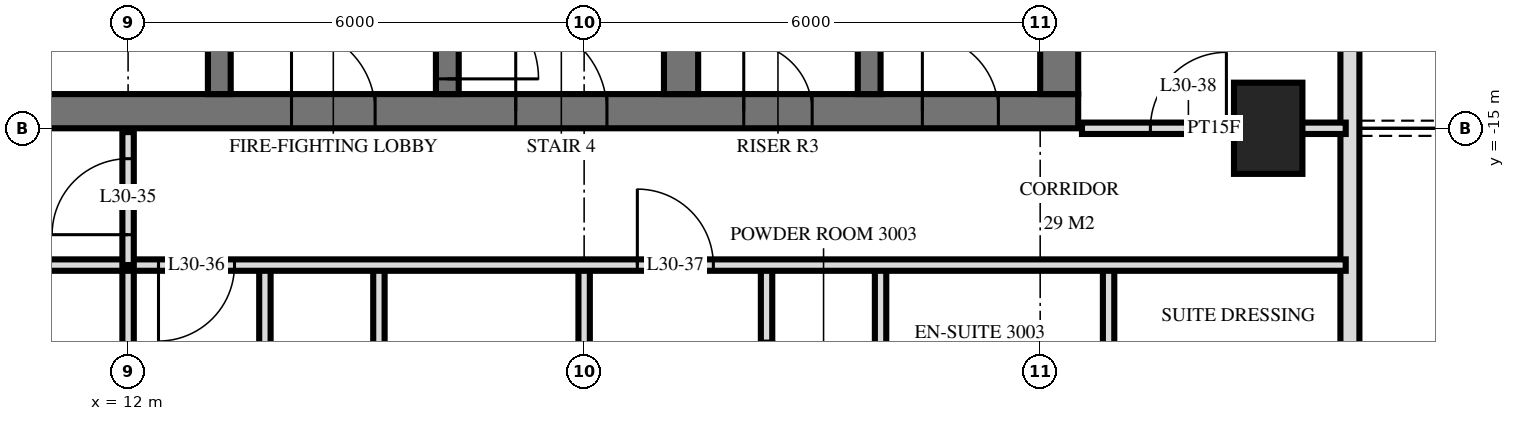
"""IFC4 building model, lengths in metres.
Left out: names, types, materials, properties, quantities, classifications, styles, units other than length and angle.
Written with IfcOpenShell. Run it as: python <this file> out.ifc"""

import sys

from ifc_helpers import new_model, si_unit, direction, frame, frame_2d, origin, origin_2d, place, context, subcontext, project, spatial, rectangle, extrude, element, fill, save


model = new_model("IFC4")
c1 = context("Model", 3, precision=1e-05, world=origin(), true_north=direction((0.0, 1.0)))
c2 = subcontext(c1, "Body", "Model", "MODEL_VIEW")
j1 = project(units=[si_unit("LENGTHUNIT", "METRE"), si_unit("PLANEANGLEUNIT", "RADIAN")], contexts=[c1])
p1 = place(None, origin())
s1 = spatial("IfcSite", under=j1, at=p1, CompositionType="ELEMENT")
p2 = place(p1, origin())
s2 = spatial("IfcBuilding", under=s1, at=p2, CompositionType="ELEMENT")
p3 = place(p2, frame((0.0, 0.0, 120.0)))
s3 = spatial("IfcBuildingStorey", under=s2, at=p3, CompositionType="ELEMENT", Elevation=120.0)
p4 = place(p3, frame((27.0, -15.0, 0.0), z_axis=(0.0, 0.0, 1.0), x_axis=(0.0, 1.0, 0.0)))
e1 = element("IfcColumn", 1, at=p4, inside=s3, PredefinedType="COLUMN", context=c2, shape_type="SweptSolid", body=[
    extrude(rectangle(XDim=1.2, YDim=0.9, at=origin_2d()), origin(), (0.0, 0.0, 1.0), 3.6),
])
p5 = place(p3, frame((10.0, -14.775, 0.0), z_axis=(0.0, 0.0, 1.0), x_axis=(1.0, 0.0, 0.0)))
e2 = element("IfcWall", 2, at=p5, inside=s3, PredefinedType="SHEAR", context=c2, shape_type="SweptSolid", body=[
    extrude(rectangle(XDim=14.5, YDim=0.45, at=frame_2d((7.25, 0.0))), origin(), (0.0, 0.0, 1.0), 3.6),
])
p6 = place(p5, frame((7.1, 0.0, 0.0)))
e3 = element("IfcOpeningElement", 3, at=p6, cuts=e2, PredefinedType="OPENING", context=c2, shape_type="SweptSolid", body=[
    extrude(rectangle(XDim=1.2, YDim=2.1, at=frame_2d((0.6, 1.05))), frame((0.0, 0.235, 0.0), z_axis=(0.0, -1.0, 0.0), x_axis=(1.0, 0.0, 0.0)), (0.0, 0.0, 1.0), 0.47),
])
p7 = place(p5, frame((4.15, 0.0, 0.0)))
e4 = element("IfcOpeningElement", 4, at=p7, cuts=e2, PredefinedType="OPENING", context=c2, shape_type="SweptSolid", body=[
    extrude(rectangle(XDim=1.1, YDim=2.1, at=frame_2d((0.55, 1.05))), frame((0.0, 0.235, 0.0), z_axis=(0.0, -1.0, 0.0), x_axis=(1.0, 0.0, 0.0)), (0.0, 0.0, 1.0), 0.47),
])
p8 = place(p5, frame((10.1, 0.0, 0.0)))
e5 = element("IfcOpeningElement", 5, at=p8, cuts=e2, PredefinedType="OPENING", context=c2, shape_type="SweptSolid", body=[
    extrude(rectangle(XDim=0.9, YDim=2.1, at=frame_2d((0.45, 1.05))), frame((0.0, 0.235, 0.0), z_axis=(0.0, -1.0, 0.0), x_axis=(1.0, 0.0, 0.0)), (0.0, 0.0, 1.0), 0.47),
])
p9 = place(p5, frame((12.45, 0.0, 0.0)))
e6 = element("IfcOpeningElement", 6, at=p9, cuts=e2, PredefinedType="OPENING", context=c2, shape_type="SweptSolid", body=[
    extrude(rectangle(XDim=1.0, YDim=2.1, at=frame_2d((0.5, 1.05))), frame((0.0, 0.235, 0.0), z_axis=(0.0, -1.0, 0.0), x_axis=(1.0, 0.0, 0.0)), (0.0, 0.0, 1.0), 0.47),
])
p10 = place(p3, frame((24.25, -14.55, 0.0), z_axis=(0.0, 0.0, 1.0), x_axis=(0.0, 1.0, 0.0)))
e7 = element("IfcWall", 7, at=p10, inside=s3, PredefinedType="SHEAR", context=c2, shape_type="SweptSolid", body=[
    extrude(rectangle(XDim=14.1, YDim=0.5, at=frame_2d((7.05, 0.0))), origin(), (0.0, 0.0, 1.0), 3.6),
])
p11 = place(p3, frame((13.2, -14.55, 0.0), z_axis=(0.0, 0.0, 1.0), x_axis=(0.0, 1.0, 0.0)))
e8 = element("IfcWall", 8, at=p11, inside=s3, PredefinedType="SHEAR", context=c2, shape_type="SweptSolid", body=[
    extrude(rectangle(XDim=5.4, YDim=0.3, at=frame_2d((2.7, 0.0))), origin(), (0.0, 0.0, 1.0), 3.6),
])
p12 = place(p11, frame((4.0, 0.0, 0.0)))
e9 = element("IfcOpeningElement", 9, at=p12, cuts=e8, PredefinedType="OPENING", context=c2, shape_type="SweptSolid", body=[
    extrude(rectangle(XDim=1.2, YDim=2.1, at=frame_2d((0.6, 1.05))), frame((0.0, 0.16, 0.0), z_axis=(0.0, -1.0, 0.0), x_axis=(1.0, 0.0, 0.0)), (0.0, 0.0, 1.0), 0.32),
])
p13 = place(p3, frame((16.2, -14.55, 0.0), z_axis=(0.0, 0.0, 1.0), x_axis=(0.0, 1.0, 0.0)))
e10 = element("IfcWall", 10, at=p13, inside=s3, PredefinedType="SHEAR", context=c2, shape_type="SweptSolid", body=[
    extrude(rectangle(XDim=5.4, YDim=0.3, at=frame_2d((2.7, 0.0))), origin(), (0.0, 0.0, 1.0), 3.6),
])
p14 = place(p13, frame((0.2, 0.0, 0.0)))
e11 = element("IfcOpeningElement", 11, at=p14, cuts=e10, PredefinedType="OPENING", context=c2, shape_type="SweptSolid", body=[
    extrude(rectangle(XDim=1.2, YDim=2.1, at=frame_2d((0.6, 1.05))), frame((0.0, 0.16, 0.0), z_axis=(0.0, -1.0, 0.0), x_axis=(1.0, 0.0, 0.0)), (0.0, 0.0, 1.0), 0.32),
])
p15 = place(p3, frame((19.275, -14.55, 0.0), z_axis=(0.0, 0.0, 1.0), x_axis=(0.0, 1.0, 0.0)))
e12 = element("IfcWall", 12, at=p15, inside=s3, PredefinedType="SHEAR", context=c2, shape_type="SweptSolid", body=[
    extrude(rectangle(XDim=5.4, YDim=0.45, at=frame_2d((2.7, 0.0))), origin(), (0.0, 0.0, 1.0), 3.6),
])
p16 = place(p3, frame((21.75, -14.55, 0.0), z_axis=(0.0, 0.0, 1.0), x_axis=(0.0, 1.0, 0.0)))
e13 = element("IfcWall", 13, at=p16, inside=s3, PredefinedType="SHEAR", context=c2, shape_type="SweptSolid", body=[
    extrude(rectangle(XDim=5.4, YDim=0.3, at=frame_2d((2.7, 0.0))), origin(), (0.0, 0.0, 1.0), 3.6),
])
p17 = place(p3, frame((28.075, -29.275, 0.0), z_axis=(0.0, 0.0, 1.0), x_axis=(0.0, 1.0, 0.0)))
e14 = element("IfcWall", 14, at=p17, inside=s3, PredefinedType="SOLIDWALL", context=c2, shape_type="SweptSolid", body=[
    extrude(rectangle(XDim=25.951, YDim=0.25, at=frame_2d((12.975, 0.0))), origin(), (0.0, 0.0, 1.0), 3.32),
])
p18 = place(p17, frame((0.575, 0.0, 0.0)))
e15 = element("IfcOpeningElement", 15, at=p18, cuts=e14, PredefinedType="OPENING", context=c2, shape_type="SweptSolid", body=[
    extrude(rectangle(XDim=1.8, YDim=2.4, at=frame_2d((0.9, 1.2))), frame((0.0, 0.135, 0.0), z_axis=(0.0, -1.0, 0.0), x_axis=(1.0, 0.0, 0.0)), (0.0, 0.0, 1.0), 0.27),
])
p19 = place(p17, frame((3.325, 0.0, 0.3)))
e16 = element("IfcOpeningElement", 16, at=p19, cuts=e14, PredefinedType="OPENING", context=c2, shape_type="SweptSolid", body=[
    extrude(rectangle(XDim=1.8, YDim=2.1, at=frame_2d((0.9, 1.05))), frame((0.0, 0.135, 0.0), z_axis=(0.0, -1.0, 0.0), x_axis=(1.0, 0.0, 0.0)), (0.0, 0.0, 1.0), 0.27),
])
p20 = place(p17, frame((6.075, 0.0, 0.0)))
e17 = element("IfcOpeningElement", 17, at=p20, cuts=e14, PredefinedType="OPENING", context=c2, shape_type="SweptSolid", body=[
    extrude(rectangle(XDim=1.8, YDim=2.4, at=frame_2d((0.9, 1.2))), frame((0.0, 0.135, 0.0), z_axis=(0.0, -1.0, 0.0), x_axis=(1.0, 0.0, 0.0)), (0.0, 0.0, 1.0), 0.27),
])
p21 = place(p17, frame((17.125, 0.0, 0.0)))
e18 = element("IfcOpeningElement", 18, at=p21, cuts=e14, PredefinedType="OPENING", context=c2, shape_type="SweptSolid", body=[
    extrude(rectangle(XDim=1.8, YDim=2.4, at=frame_2d((0.9, 1.2))), frame((0.0, 0.135, 0.0), z_axis=(0.0, -1.0, 0.0), x_axis=(1.0, 0.0, 0.0)), (0.0, 0.0, 1.0), 0.27),
])
p22 = place(p3, frame((24.9, -19.8, 0.0), z_axis=(0.0, 0.0, 1.0), x_axis=(0.0, 1.0, 0.0)))
e19 = element("IfcWall", 19, at=p22, inside=s3, PredefinedType="PARTITIONING", context=c2, shape_type="SweptSolid", body=[
    extrude(rectangle(XDim=3.0, YDim=0.15, at=frame_2d((1.5, 0.0))), origin(), (0.0, 0.0, 1.0), 3.32),
])
p23 = place(p3, frame((21.9, -19.8, 0.0), z_axis=(0.0, 0.0, 1.0), x_axis=(0.0, 1.0, 0.0)))
e20 = element("IfcWall", 20, at=p23, inside=s3, PredefinedType="PLUMBINGWALL", context=c2, shape_type="SweptSolid", body=[
    extrude(rectangle(XDim=3.0, YDim=0.15, at=frame_2d((1.5, 0.0))), origin(), (0.0, 0.0, 1.0), 3.32),
])
p24 = place(p3, frame((20.4, -19.8, 0.0), z_axis=(0.0, 0.0, 1.0), x_axis=(0.0, 1.0, 0.0)))
e21 = element("IfcWall", 21, at=p24, inside=s3, PredefinedType="PARTITIONING", context=c2, shape_type="SweptSolid", body=[
    extrude(rectangle(XDim=3.0, YDim=0.15, at=frame_2d((1.5, 0.0))), origin(), (0.0, 0.0, 1.0), 3.32),
])
p25 = place(p24, frame((1.0, 0.0, 0.0)))
e22 = element("IfcOpeningElement", 22, at=p25, cuts=e21, PredefinedType="OPENING", context=c2, shape_type="SweptSolid", body=[
    extrude(rectangle(XDim=1.0, YDim=2.1, at=frame_2d((0.5, 1.05))), frame((0.0, 0.085, 0.0), z_axis=(0.0, -1.0, 0.0), x_axis=(1.0, 0.0, 0.0)), (0.0, 0.0, 1.0), 0.17),
])
p26 = place(p3, frame((18.0, -19.8, 0.0), z_axis=(0.0, 0.0, 1.0), x_axis=(0.0, 1.0, 0.0)))
e23 = element("IfcWall", 23, at=p26, inside=s3, PredefinedType="PARTITIONING", context=c2, shape_type="SweptSolid", body=[
    extrude(rectangle(XDim=3.0, YDim=0.15, at=frame_2d((1.5, 0.0))), origin(), (0.0, 0.0, 1.0), 3.32),
])
p27 = place(p3, frame((15.3, -20.6, 0.0), z_axis=(0.0, 0.0, 1.0), x_axis=(0.0, 1.0, 0.0)))
e24 = element("IfcWall", 24, at=p27, inside=s3, PredefinedType="PARTITIONING", context=c2, shape_type="SweptSolid", body=[
    extrude(rectangle(XDim=3.8, YDim=0.15, at=frame_2d((1.9, 0.0))), origin(), (0.0, 0.0, 1.0), 3.32),
])
p28 = place(p3, frame((13.8, -20.6, 0.0), z_axis=(0.0, 0.0, 1.0), x_axis=(0.0, 1.0, 0.0)))
e25 = element("IfcWall", 25, at=p28, inside=s3, PredefinedType="PARTITIONING", context=c2, shape_type="SweptSolid", body=[
    extrude(rectangle(XDim=3.8, YDim=0.15, at=frame_2d((1.9, 0.0))), origin(), (0.0, 0.0, 1.0), 3.32),
])
p29 = place(p28, frame((1.45, 0.0, 0.0)))
e26 = element("IfcOpeningElement", 26, at=p29, cuts=e25, PredefinedType="OPENING", context=c2, shape_type="SweptSolid", body=[
    extrude(rectangle(XDim=0.9, YDim=2.1, at=frame_2d((0.45, 1.05))), frame((0.0, 0.085, 0.0), z_axis=(0.0, -1.0, 0.0), x_axis=(1.0, 0.0, 0.0)), (0.0, 0.0, 1.0), 0.17),
])
p30 = place(p3, frame((12.0, -16.8, 0.0), z_axis=(0.0, 0.0, 1.0), x_axis=(0.0, 1.0, 0.0)))
e27 = element("IfcWall", 27, at=p30, inside=s3, PredefinedType="PARTITIONING", context=c2, shape_type="SweptSolid", body=[
    extrude(rectangle(XDim=1.75, YDim=0.15, at=frame_2d((0.875, 0.0))), origin(), (0.0, 0.0, 1.0), 3.32),
])
p31 = place(p30, frame((0.4, 0.0, 0.0)))
e28 = element("IfcOpeningElement", 28, at=p31, cuts=e27, PredefinedType="OPENING", context=c2, shape_type="SweptSolid", body=[
    extrude(rectangle(XDim=1.0, YDim=2.1, at=frame_2d((0.5, 1.05))), frame((0.0, 0.085, 0.0), z_axis=(0.0, -1.0, 0.0), x_axis=(1.0, 0.0, 0.0)), (0.0, 0.0, 1.0), 0.17),
])
p32 = place(p3, frame((12.0, -33.62, 0.0), z_axis=(0.0, 0.0, 1.0), x_axis=(0.0, 1.0, 0.0)))
e29 = element("IfcWall", 29, at=p32, inside=s3, PredefinedType="PARTITIONING", context=c2, shape_type="SweptSolid", body=[
    extrude(rectangle(XDim=16.82, YDim=0.15, at=frame_2d((8.41, 0.0))), origin(), (0.0, 0.0, 1.0), 3.32),
])
p33 = place(p3, frame((-28.02, -16.8, 0.0), z_axis=(0.0, 0.0, 1.0), x_axis=(1.0, 0.0, 0.0)))
e30 = element("IfcWall", 30, at=p33, inside=s3, PredefinedType="PARTITIONING", context=c2, shape_type="SweptSolid", body=[
    extrude(rectangle(XDim=56.04, YDim=0.15, at=frame_2d((28.02, 0.0))), origin(), (0.0, 0.0, 1.0), 3.32),
])
p34 = place(p33, frame((12.52, 0.0, 0.0)))
e31 = element("IfcOpeningElement", 31, at=p34, cuts=e30, PredefinedType="OPENING", context=c2, shape_type="SweptSolid", body=[
    extrude(rectangle(XDim=1.0, YDim=2.1, at=frame_2d((0.5, 1.05))), frame((0.0, 0.085, 0.0), z_axis=(0.0, -1.0, 0.0), x_axis=(1.0, 0.0, 0.0)), (0.0, 0.0, 1.0), 0.17),
])
p35 = place(p33, frame((8.32, 0.0, 0.0)))
e32 = element("IfcOpeningElement", 32, at=p35, cuts=e30, PredefinedType="OPENING", context=c2, shape_type="SweptSolid", body=[
    extrude(rectangle(XDim=1.0, YDim=2.1, at=frame_2d((0.5, 1.05))), frame((0.0, 0.085, 0.0), z_axis=(0.0, -1.0, 0.0), x_axis=(1.0, 0.0, 0.0)), (0.0, 0.0, 1.0), 0.17),
])
p36 = place(p33, frame((40.42, 0.0, 0.0)))
e33 = element("IfcOpeningElement", 33, at=p36, cuts=e30, PredefinedType="OPENING", context=c2, shape_type="SweptSolid", body=[
    extrude(rectangle(XDim=1.0, YDim=2.1, at=frame_2d((0.5, 1.05))), frame((0.0, 0.085, 0.0), z_axis=(0.0, -1.0, 0.0), x_axis=(1.0, 0.0, 0.0)), (0.0, 0.0, 1.0), 0.17),
])
p37 = place(p33, frame((46.72, 0.0, 0.0)))
e34 = element("IfcOpeningElement", 34, at=p37, cuts=e30, PredefinedType="OPENING", context=c2, shape_type="SweptSolid", body=[
    extrude(rectangle(XDim=1.0, YDim=2.1, at=frame_2d((0.5, 1.05))), frame((0.0, 0.085, 0.0), z_axis=(0.0, -1.0, 0.0), x_axis=(1.0, 0.0, 0.0)), (0.0, 0.0, 1.0), 0.17),
])
p38 = place(p33, frame((21.52, 0.0, 0.0)))
e35 = element("IfcOpeningElement", 35, at=p38, cuts=e30, PredefinedType="OPENING", context=c2, shape_type="SweptSolid", body=[
    extrude(rectangle(XDim=1.0, YDim=2.1, at=frame_2d((0.5, 1.05))), frame((0.0, 0.085, 0.0), z_axis=(0.0, -1.0, 0.0), x_axis=(1.0, 0.0, 0.0)), (0.0, 0.0, 1.0), 0.17),
])
p39 = place(p33, frame((30.52, 0.0, 0.0)))
e36 = element("IfcOpeningElement", 36, at=p39, cuts=e30, PredefinedType="OPENING", context=c2, shape_type="SweptSolid", body=[
    extrude(rectangle(XDim=1.0, YDim=2.1, at=frame_2d((0.5, 1.05))), frame((0.0, 0.085, 0.0), z_axis=(0.0, -1.0, 0.0), x_axis=(1.0, 0.0, 0.0)), (0.0, 0.0, 1.0), 0.17),
])
p40 = place(p33, frame((36.52, 0.0, 0.0)))
e37 = element("IfcOpeningElement", 37, at=p40, cuts=e30, PredefinedType="OPENING", context=c2, shape_type="SweptSolid", body=[
    extrude(rectangle(XDim=1.0, YDim=2.1, at=frame_2d((0.5, 1.05))), frame((0.0, 0.085, 0.0), z_axis=(0.0, -1.0, 0.0), x_axis=(1.0, 0.0, 0.0)), (0.0, 0.0, 1.0), 0.17),
])
p41 = place(p3, frame((24.55, -15.0, 0.0), z_axis=(0.0, 0.0, 1.0), x_axis=(1.0, 0.0, 0.0)))
e38 = element("IfcWall", 38, at=p41, inside=s3, PredefinedType="PARTITIONING", context=c2, shape_type="SweptSolid", body=[
    extrude(rectangle(XDim=3.47, YDim=0.15, at=frame_2d((1.735, 0.0))), origin(), (0.0, 0.0, 1.0), 3.32),
])
p42 = place(p41, frame((0.9, 0.0, 0.0)))
e39 = element("IfcOpeningElement", 39, at=p42, cuts=e38, PredefinedType="OPENING", context=c2, shape_type="SweptSolid", body=[
    extrude(rectangle(XDim=1.0, YDim=2.1, at=frame_2d((0.5, 1.05))), frame((0.0, 0.085, 0.0), z_axis=(0.0, -1.0, 0.0), x_axis=(1.0, 0.0, 0.0)), (0.0, 0.0, 1.0), 0.17),
])
p43 = place(p6, origin())
e40 = element("IfcDoor", 40, at=p43, inside=s3, OperationType="SINGLE_SWING_RIGHT", PredefinedType="DOOR", context=c2, shape_type="SweptSolid", body=[
    extrude(rectangle(XDim=1.2, YDim=2.1, at=frame_2d((0.6, 1.05))), frame((0.0, 0.025, 0.0), z_axis=(0.0, -1.0, 0.0), x_axis=(1.0, 0.0, 0.0)), (0.0, 0.0, 1.0), 0.05),
])
fill(e3, e40)
p44 = place(p7, origin())
e41 = element("IfcDoor", 41, at=p44, inside=s3, OperationType="SINGLE_SWING_RIGHT", PredefinedType="DOOR", context=c2, shape_type="SweptSolid", body=[
    extrude(rectangle(XDim=1.1, YDim=2.1, at=frame_2d((0.55, 1.05))), frame((0.0, 0.025, 0.0), z_axis=(0.0, -1.0, 0.0), x_axis=(1.0, 0.0, 0.0)), (0.0, 0.0, 1.0), 0.05),
])
fill(e4, e41)
p45 = place(p8, origin())
e42 = element("IfcDoor", 42, at=p45, inside=s3, OperationType="SINGLE_SWING_RIGHT", PredefinedType="DOOR", context=c2, shape_type="SweptSolid", body=[
    extrude(rectangle(XDim=0.9, YDim=2.1, at=frame_2d((0.45, 1.05))), frame((0.0, 0.025, 0.0), z_axis=(0.0, -1.0, 0.0), x_axis=(1.0, 0.0, 0.0)), (0.0, 0.0, 1.0), 0.05),
])
fill(e5, e42)
p46 = place(p9, origin())
e43 = element("IfcDoor", 43, at=p46, inside=s3, OperationType="SINGLE_SWING_RIGHT", PredefinedType="DOOR", context=c2, shape_type="SweptSolid", body=[
    extrude(rectangle(XDim=1.0, YDim=2.1, at=frame_2d((0.5, 1.05))), frame((0.0, 0.025, 0.0), z_axis=(0.0, -1.0, 0.0), x_axis=(1.0, 0.0, 0.0)), (0.0, 0.0, 1.0), 0.05),
])
fill(e6, e43)
p47 = place(p14, frame((0.6, 0.0, 0.0), z_axis=(0.0, 0.0, 1.0), x_axis=(-1.0, 0.0, 0.0)))
e44 = element("IfcDoor", 44, at=p47, inside=s3, OperationType="SINGLE_SWING_LEFT", PredefinedType="DOOR", context=c2, shape_type="SweptSolid", body=[
    extrude(rectangle(XDim=1.2, YDim=2.1, at=frame_2d((0.0, 1.05))), frame((0.0, -0.025, 0.0), z_axis=(0.0, 1.0, 0.0), x_axis=(-1.0, 0.0, 0.0)), (0.0, 0.0, 1.0), 0.05),
])
fill(e11, e44)
p48 = place(p31, origin())
e45 = element("IfcDoor", 45, at=p48, inside=s3, OperationType="SINGLE_SWING_RIGHT", PredefinedType="DOOR", context=c2, shape_type="SweptSolid", body=[
    extrude(rectangle(XDim=1.0, YDim=2.1, at=frame_2d((0.5, 1.05))), frame((0.0, 0.025, 0.0), z_axis=(0.0, -1.0, 0.0), x_axis=(1.0, 0.0, 0.0)), (0.0, 0.0, 1.0), 0.05),
])
fill(e28, e45)
p49 = place(p36, frame((0.5, 0.0, 0.0), z_axis=(0.0, 0.0, 1.0), x_axis=(-1.0, 0.0, 0.0)))
e46 = element("IfcDoor", 46, at=p49, inside=s3, OperationType="SINGLE_SWING_LEFT", PredefinedType="DOOR", context=c2, shape_type="SweptSolid", body=[
    extrude(rectangle(XDim=1.0, YDim=2.1, at=frame_2d((0.0, 1.05))), frame((0.0, -0.025, 0.0), z_axis=(0.0, 1.0, 0.0), x_axis=(-1.0, 0.0, 0.0)), (0.0, 0.0, 1.0), 0.05),
])
fill(e33, e46)
p50 = place(p37, origin())
e47 = element("IfcDoor", 47, at=p50, inside=s3, OperationType="SINGLE_SWING_RIGHT", PredefinedType="DOOR", context=c2, shape_type="SweptSolid", body=[
    extrude(rectangle(XDim=1.0, YDim=2.1, at=frame_2d((0.5, 1.05))), frame((0.0, 0.025, 0.0), z_axis=(0.0, -1.0, 0.0), x_axis=(1.0, 0.0, 0.0)), (0.0, 0.0, 1.0), 0.05),
])
fill(e34, e47)
p51 = place(p42, origin())
e48 = element("IfcDoor", 48, at=p51, inside=s3, OperationType="SINGLE_SWING_LEFT", PredefinedType="DOOR", context=c2, shape_type="SweptSolid", body=[
    extrude(rectangle(XDim=1.0, YDim=2.1, at=frame_2d((0.5, 1.05))), frame((0.0, 0.025, 0.0), z_axis=(0.0, -1.0, 0.0), x_axis=(1.0, 0.0, 0.0)), (0.0, 0.0, 1.0), 0.05),
])
fill(e39, e48)
save(model, sys.argv[1])
